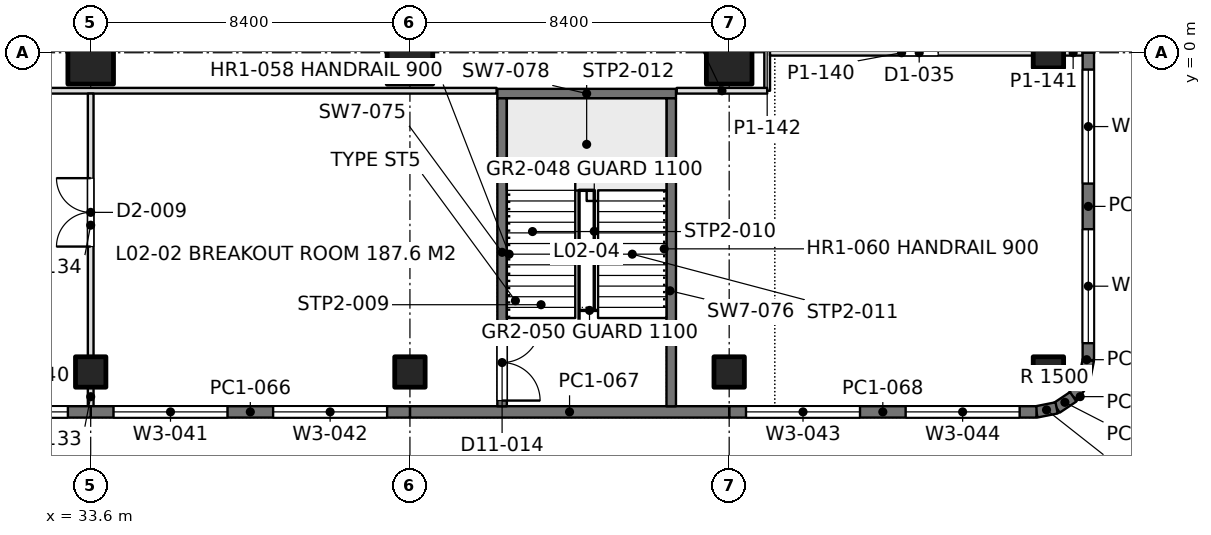
"""IFC4 building model, lengths in metres.
Left out: names, types, materials, properties, quantities, classifications, styles, units other than length and angle.
Written with IfcOpenShell. Run it as: python <this file> out.ifc"""

import sys

from ifc_helpers import new_model, si_unit, direction, frame, frame_2d, origin, origin_2d, place, context, subcontext, project, spatial, rectangle, extrude, element, fill, save


model = new_model("IFC4")
c1 = context("Model", 3, precision=1e-05, world=origin(), true_north=direction((0.0, 1.0)))
c2 = subcontext(c1, "Body", "Model", "MODEL_VIEW")
j1 = project(units=[si_unit("LENGTHUNIT", "METRE"), si_unit("PLANEANGLEUNIT", "RADIAN")], contexts=[c1])
p1 = place(None, origin())
s1 = spatial("IfcSite", under=j1, at=p1, CompositionType="ELEMENT")
p2 = place(p1, origin())
s2 = spatial("IfcBuilding", under=s1, at=p2, CompositionType="ELEMENT")
p3 = place(p2, frame((0.0, 0.0, 9.9)))
s3 = spatial("IfcBuildingStorey", under=s2, at=p3, CompositionType="ELEMENT", Elevation=9.9)
p4 = place(p3, frame((33.6, -8.4, 0.0), z_axis=(0.0, 0.0, 1.0), x_axis=(1.0, 0.0, 0.0)))
e1 = element("IfcColumn", 1, at=p4, inside=s3, PredefinedType="COLUMN", context=c2, shape_type="SweptSolid", body=[
    extrude(rectangle(XDim=0.8, YDim=0.8, at=origin_2d()), origin(), (0.0, 0.0, 1.0), 4.5),
])
p5 = place(p3, frame((33.6, 0.0, 0.0), z_axis=(0.0, 0.0, 1.0), x_axis=(1.0, 0.0, 0.0)))
e2 = element("IfcColumn", 2, at=p5, inside=s3, PredefinedType="COLUMN", context=c2, shape_type="SweptSolid", body=[
    extrude(rectangle(XDim=1.2, YDim=1.65, at=origin_2d()), origin(), (0.0, 0.0, 1.0), 4.5),
])
p6 = place(p3, frame((42.0, -8.4, 0.0), z_axis=(0.0, 0.0, 1.0), x_axis=(1.0, 0.0, 0.0)))
e3 = element("IfcColumn", 3, at=p6, inside=s3, PredefinedType="COLUMN", context=c2, shape_type="SweptSolid", body=[
    extrude(rectangle(XDim=0.8, YDim=0.8, at=origin_2d()), origin(), (0.0, 0.0, 1.0), 4.5),
])
p7 = place(p3, frame((42.0, 0.0, 0.0), z_axis=(0.0, 0.0, 1.0), x_axis=(1.0, 0.0, 0.0)))
e4 = element("IfcColumn", 4, at=p7, inside=s3, PredefinedType="COLUMN", context=c2, shape_type="SweptSolid", body=[
    extrude(rectangle(XDim=1.2, YDim=1.65, at=origin_2d()), origin(), (0.0, 0.0, 1.0), 4.5),
])
p8 = place(p3, frame((50.4, -8.4, 0.0), z_axis=(0.0, 0.0, 1.0), x_axis=(1.0, 0.0, 0.0)))
e5 = element("IfcColumn", 5, at=p8, inside=s3, PredefinedType="COLUMN", context=c2, shape_type="SweptSolid", body=[
    extrude(rectangle(XDim=0.8, YDim=0.8, at=origin_2d()), origin(), (0.0, 0.0, 1.0), 4.5),
])
p9 = place(p3, frame((50.4, 0.0, 0.0), z_axis=(0.0, 0.0, 1.0), x_axis=(1.0, 0.0, 0.0)))
e6 = element("IfcColumn", 6, at=p9, inside=s3, PredefinedType="COLUMN", context=c2, shape_type="SweptSolid", body=[
    extrude(rectangle(XDim=1.2, YDim=1.65, at=origin_2d()), origin(), (0.0, 0.0, 1.0), 4.5),
])
for number, where, z_axis, x_axis in (
    (7, (58.8, -8.4, 0.0), (0.0, 0.0, 1.0), (1.0, 0.0, 0.0)),
    (8, (58.8, 0.0, 0.0), (0.0, 0.0, 1.0), (1.0, 0.0, 0.0)),
):
    element("IfcColumn", number, at=place(p3, frame(where, z_axis=z_axis, x_axis=x_axis)), inside=s3, PredefinedType="COLUMN", context=c2, shape_type="SweptSolid", body=[
        extrude(rectangle(XDim=0.8, YDim=0.8, at=origin_2d()), origin(), (0.0, 0.0, 1.0), 4.5),
    ])
p10 = place(p3, frame((58.485, -9.45, 0.0), z_axis=(0.0, 0.0, 1.0), x_axis=(-1.0, 0.0, 0.0)))
e9 = element("IfcWall", 9, at=p10, inside=s3, PredefinedType="SOLIDWALL", context=c2, shape_type="SweptSolid", body=[
    extrude(rectangle(XDim=8.085, YDim=0.3, at=frame_2d((4.042, 0.0))), origin(), (0.0, 0.0, 1.0), 4.3),
])
p11 = place(p10, frame((0.443, 0.0, 0.9)))
e10 = element("IfcOpeningElement", 10, at=p11, cuts=e9, PredefinedType="OPENING", context=c2, shape_type="SweptSolid", body=[
    extrude(rectangle(XDim=3.0, YDim=2.4, at=frame_2d((1.5, 1.2))), frame((0.0, 0.16, 0.0), z_axis=(0.0, -1.0, 0.0), x_axis=(1.0, 0.0, 0.0)), (0.0, 0.0, 1.0), 0.32),
])
p12 = place(p10, frame((4.643, 0.0, 0.9)))
e11 = element("IfcOpeningElement", 11, at=p12, cuts=e9, PredefinedType="OPENING", context=c2, shape_type="SweptSolid", body=[
    extrude(rectangle(XDim=3.0, YDim=2.4, at=frame_2d((1.5, 1.2))), frame((0.0, 0.16, 0.0), z_axis=(0.0, -1.0, 0.0), x_axis=(1.0, 0.0, 0.0)), (0.0, 0.0, 1.0), 0.32),
])
p13 = place(p3, frame((50.4, -9.45, 0.0), z_axis=(0.0, 0.0, 1.0), x_axis=(-1.0, 0.0, 0.0)))
e12 = element("IfcWall", 12, at=p13, inside=s3, PredefinedType="SOLIDWALL", context=c2, shape_type="SweptSolid", body=[
    extrude(rectangle(XDim=8.4, YDim=0.3, at=frame_2d((4.2, 0.0))), origin(), (0.0, 0.0, 1.0), 4.3),
])
p14 = place(p3, frame((42.0, -9.45, 0.0), z_axis=(0.0, 0.0, 1.0), x_axis=(-1.0, 0.0, 0.0)))
e13 = element("IfcWall", 13, at=p14, inside=s3, PredefinedType="SOLIDWALL", context=c2, shape_type="SweptSolid", body=[
    extrude(rectangle(XDim=8.4, YDim=0.3, at=frame_2d((4.2, 0.0))), origin(), (0.0, 0.0, 1.0), 4.3),
])
p15 = place(p14, frame((0.6, 0.0, 0.9)))
e14 = element("IfcOpeningElement", 14, at=p15, cuts=e13, PredefinedType="OPENING", context=c2, shape_type="SweptSolid", body=[
    extrude(rectangle(XDim=3.0, YDim=2.4, at=frame_2d((1.5, 1.2))), frame((0.0, 0.16, 0.0), z_axis=(0.0, -1.0, 0.0), x_axis=(1.0, 0.0, 0.0)), (0.0, 0.0, 1.0), 0.32),
])
p16 = place(p14, frame((4.8, 0.0, 0.9)))
e15 = element("IfcOpeningElement", 15, at=p16, cuts=e13, PredefinedType="OPENING", context=c2, shape_type="SweptSolid", body=[
    extrude(rectangle(XDim=3.0, YDim=2.4, at=frame_2d((1.5, 1.2))), frame((0.0, 0.16, 0.0), z_axis=(0.0, -1.0, 0.0), x_axis=(1.0, 0.0, 0.0)), (0.0, 0.0, 1.0), 0.32),
])
p17 = place(p3, frame((33.6, -9.45, 0.0), z_axis=(0.0, 0.0, 1.0), x_axis=(-1.0, 0.0, 0.0)))
e16 = element("IfcWall", 16, at=p17, inside=s3, PredefinedType="SOLIDWALL", context=c2, shape_type="SweptSolid", body=[
    extrude(rectangle(XDim=8.4, YDim=0.3, at=frame_2d((4.2, 0.0))), origin(), (0.0, 0.0, 1.0), 4.3),
])
p18 = place(p17, frame((0.6, 0.0, 0.9)))
e17 = element("IfcOpeningElement", 17, at=p18, cuts=e16, PredefinedType="OPENING", context=c2, shape_type="SweptSolid", body=[
    extrude(rectangle(XDim=3.0, YDim=2.4, at=frame_2d((1.5, 1.2))), frame((0.0, 0.16, 0.0), z_axis=(0.0, -1.0, 0.0), x_axis=(1.0, 0.0, 0.0)), (0.0, 0.0, 1.0), 0.32),
])
p19 = place(p17, frame((4.8, 0.0, 0.9)))
e18 = element("IfcOpeningElement", 18, at=p19, cuts=e16, PredefinedType="OPENING", context=c2, shape_type="SweptSolid", body=[
    extrude(rectangle(XDim=3.0, YDim=2.4, at=frame_2d((1.5, 1.2))), frame((0.0, 0.16, 0.0), z_axis=(0.0, -1.0, 0.0), x_axis=(1.0, 0.0, 0.0)), (0.0, 0.0, 1.0), 0.32),
])
p20 = place(p3, frame((59.85, 0.0, 0.0), z_axis=(0.0, 0.0, 1.0), x_axis=(0.0, -1.0, 0.0)))
e19 = element("IfcWall", 19, at=p20, inside=s3, PredefinedType="SOLIDWALL", context=c2, shape_type="SweptSolid", body=[
    extrude(rectangle(XDim=8.085, YDim=0.3, at=frame_2d((4.042, 0.0))), origin(), (0.0, 0.0, 1.0), 4.3),
])
p21 = place(p20, frame((0.443, 0.0, 0.9)))
e20 = element("IfcOpeningElement", 20, at=p21, cuts=e19, PredefinedType="OPENING", context=c2, shape_type="SweptSolid", body=[
    extrude(rectangle(XDim=3.0, YDim=2.4, at=frame_2d((1.5, 1.2))), frame((0.0, 0.16, 0.0), z_axis=(0.0, -1.0, 0.0), x_axis=(1.0, 0.0, 0.0)), (0.0, 0.0, 1.0), 0.32),
])
p22 = place(p20, frame((4.643, 0.0, 0.9)))
e21 = element("IfcOpeningElement", 21, at=p22, cuts=e19, PredefinedType="OPENING", context=c2, shape_type="SweptSolid", body=[
    extrude(rectangle(XDim=3.0, YDim=2.4, at=frame_2d((1.5, 1.2))), frame((0.0, 0.16, 0.0), z_axis=(0.0, -1.0, 0.0), x_axis=(1.0, 0.0, 0.0)), (0.0, 0.0, 1.0), 0.32),
])
p23 = place(p3, frame((59.85, -8.085, 0.0), z_axis=(0.0, 0.0, 1.0), x_axis=(-0.1955082817, -0.980702050465, 0.0)))
e22 = element("IfcWall", 22, at=p23, inside=s3, PredefinedType="SOLIDWALL", context=c2, shape_type="SweptSolid", body=[
    extrude(rectangle(XDim=0.541, YDim=0.3, at=frame_2d((0.271, 0.0))), origin(), (0.0, 0.0, 1.0), 4.3),
])
p24 = place(p3, frame((59.744, -8.615, 0.0), z_axis=(0.0, 0.0, 1.0), x_axis=(-0.555236195849, -0.831692711774, 0.0)))
e23 = element("IfcWall", 23, at=p24, inside=s3, PredefinedType="SOLIDWALL", context=c2, shape_type="SweptSolid", body=[
    extrude(rectangle(XDim=0.525, YDim=0.3, at=frame_2d((0.263, 0.0))), origin(), (0.0, 0.0, 1.0), 4.3),
])
p25 = place(p3, frame((59.453, -9.052, 0.0), z_axis=(0.0, 0.0, 1.0), x_axis=(-0.831621430339, -0.55534295404, 0.0)))
e24 = element("IfcWall", 24, at=p25, inside=s3, PredefinedType="SOLIDWALL", context=c2, shape_type="SweptSolid", body=[
    extrude(rectangle(XDim=0.526, YDim=0.3, at=frame_2d((0.263, 0.0))), origin(), (0.0, 0.0, 1.0), 4.3),
])
p26 = place(p3, frame((59.015, -9.344, 0.0), z_axis=(0.0, 0.0, 1.0), x_axis=(-0.980788534345, -0.195073962632, 0.0)))
e25 = element("IfcWall", 25, at=p26, inside=s3, PredefinedType="SOLIDWALL", context=c2, shape_type="SweptSolid", body=[
    extrude(rectangle(XDim=0.541, YDim=0.3, at=frame_2d((0.271, 0.0))), origin(), (0.0, 0.0, 1.0), 4.3),
])
p27 = place(p3, frame((6.12, -1.0, 0.0), z_axis=(0.0, 0.0, 1.0), x_axis=(1.0, 0.0, 0.0)))
e26 = element("IfcWall", 26, at=p27, inside=s3, PredefinedType="PARTITIONING", context=c2, shape_type="SweptSolid", body=[
    extrude(rectangle(XDim=38.16, YDim=0.15, at=frame_2d((19.08, 0.0))), origin(), (0.0, 0.0, 1.0), 3.65),
])
p28 = place(p27, frame((13.98, 0.0, 0.0)))
e27 = element("IfcOpeningElement", 27, at=p28, cuts=e26, PredefinedType="OPENING", context=c2, shape_type="SweptSolid", body=[
    extrude(rectangle(XDim=1.8, YDim=2.2, at=frame_2d((0.9, 1.1))), frame((0.0, 0.085, 0.0), z_axis=(0.0, -1.0, 0.0), x_axis=(1.0, 0.0, 0.0)), (0.0, 0.0, 1.0), 0.17),
])
p29 = place(p27, frame((22.38, 0.0, 0.0)))
e28 = element("IfcOpeningElement", 28, at=p29, cuts=e26, PredefinedType="OPENING", context=c2, shape_type="SweptSolid", body=[
    extrude(rectangle(XDim=1.8, YDim=2.2, at=frame_2d((0.9, 1.1))), frame((0.0, 0.085, 0.0), z_axis=(0.0, -1.0, 0.0), x_axis=(1.0, 0.0, 0.0)), (0.0, 0.0, 1.0), 0.17),
])
p30 = place(p3, frame((49.02, -1.0, 0.0), z_axis=(0.0, 0.0, 1.0), x_axis=(1.0, 0.0, 0.0)))
e29 = element("IfcWall", 29, at=p30, inside=s3, PredefinedType="PARTITIONING", context=c2, shape_type="SweptSolid", body=[
    extrude(rectangle(XDim=2.38, YDim=0.15, at=frame_2d((1.19, 0.0))), origin(), (0.0, 0.0, 1.0), 3.65),
])
p31 = place(p3, frame((51.474, 0.0, 0.0), z_axis=(0.0, 0.0, 1.0), x_axis=(1.0, 0.0, 0.0)))
e30 = element("IfcWall", 30, at=p31, inside=s3, PredefinedType="PARTITIONING", context=c2, shape_type="SweptSolid", body=[
    extrude(rectangle(XDim=6.927, YDim=0.15, at=frame_2d((3.463, 0.0))), origin(), (0.0, 0.0, 1.0), 3.65),
])
p32 = place(p31, frame((3.426, 0.0, 0.0)))
e31 = element("IfcOpeningElement", 31, at=p32, cuts=e30, PredefinedType="OPENING", context=c2, shape_type="SweptSolid", body=[
    extrude(rectangle(XDim=1.0, YDim=2.2, at=frame_2d((0.5, 1.1))), frame((0.0, 0.085, 0.0), z_axis=(0.0, -1.0, 0.0), x_axis=(1.0, 0.0, 0.0)), (0.0, 0.0, 1.0), 0.17),
])
p33 = place(p3, frame((59.199, 0.0, 0.0), z_axis=(0.0, 0.0, 1.0), x_axis=(1.0, 0.0, 0.0)))
e32 = element("IfcWall", 32, at=p33, inside=s3, PredefinedType="PARTITIONING", context=c2, shape_type="SweptSolid", body=[
    extrude(rectangle(XDim=0.503, YDim=0.15, at=frame_2d((0.251, 0.0))), origin(), (0.0, 0.0, 1.0), 4.3),
])
p34 = place(p3, frame((51.4, -1.0, 0.0), z_axis=(0.0, 0.0, 1.0), x_axis=(0.0, 1.0, 0.0)))
e33 = element("IfcWall", 33, at=p34, inside=s3, PredefinedType="PARTITIONING", context=c2, shape_type="SweptSolid", body=[
    extrude(rectangle(XDim=2.38, YDim=0.15, at=frame_2d((1.19, 0.0))), origin(), (0.0, 0.0, 1.0), 3.65),
])
p35 = place(p3, frame((33.6, -9.3, 0.0), z_axis=(0.0, 0.0, 1.0), x_axis=(0.0, 1.0, 0.0)))
e34 = element("IfcWall", 34, at=p35, inside=s3, PredefinedType="PARTITIONING", context=c2, shape_type="SweptSolid", body=[
    extrude(rectangle(XDim=0.501, YDim=0.15, at=frame_2d((0.25, 0.0))), origin(), (0.0, 0.0, 1.0), 4.3),
])
p36 = place(p3, frame((33.6, -8.001, 0.0), z_axis=(0.0, 0.0, 1.0), x_axis=(0.0, 1.0, 0.0)))
e35 = element("IfcWall", 35, at=p36, inside=s3, PredefinedType="PARTITIONING", context=c2, shape_type="SweptSolid", body=[
    extrude(rectangle(XDim=6.927, YDim=0.15, at=frame_2d((3.463, 0.0))), origin(), (0.0, 0.0, 1.0), 3.65),
])
p37 = place(p36, frame((2.901, 0.0, 0.0)))
e36 = element("IfcOpeningElement", 36, at=p37, cuts=e35, PredefinedType="OPENING", context=c2, shape_type="SweptSolid", body=[
    extrude(rectangle(XDim=1.8, YDim=2.2, at=frame_2d((0.9, 1.1))), frame((0.0, 0.085, 0.0), z_axis=(0.0, -1.0, 0.0), x_axis=(1.0, 0.0, 0.0)), (0.0, 0.0, 1.0), 0.17),
])
p38 = place(p3, frame((44.425, -9.302, 0.0), z_axis=(0.0, 0.0, 1.0), x_axis=(0.0, 1.0, 0.0)))
e37 = element("IfcWall", 37, at=p38, inside=s3, PredefinedType="SOLIDWALL", context=c2, shape_type="SweptSolid", body=[
    extrude(rectangle(XDim=8.102, YDim=0.25, at=frame_2d((4.051, 0.0))), origin(), (0.0, 0.0, 1.0), 4.5),
])
p39 = place(p38, frame((0.15, 0.0, 0.0)))
e38 = element("IfcOpeningElement", 38, at=p39, cuts=e37, PredefinedType="OPENING", context=c2, shape_type="SweptSolid", body=[
    extrude(rectangle(XDim=2.0, YDim=2.2, at=frame_2d((1.0, 1.1))), frame((0.0, 0.135, 0.0), z_axis=(0.0, -1.0, 0.0), x_axis=(1.0, 0.0, 0.0)), (0.0, 0.0, 1.0), 0.27),
])
p40 = place(p3, frame((48.875, -9.302, 0.0), z_axis=(0.0, 0.0, 1.0), x_axis=(0.0, 1.0, 0.0)))
e39 = element("IfcWall", 39, at=p40, inside=s3, PredefinedType="SOLIDWALL", context=c2, shape_type="SweptSolid", body=[
    extrude(rectangle(XDim=8.102, YDim=0.25, at=frame_2d((4.051, 0.0))), origin(), (0.0, 0.0, 1.0), 4.5),
])
p41 = place(p3, frame((44.3, -1.075, 0.0), z_axis=(0.0, 0.0, 1.0), x_axis=(1.0, 0.0, 0.0)))
e40 = element("IfcWall", 40, at=p41, inside=s3, PredefinedType="SOLIDWALL", context=c2, shape_type="SweptSolid", body=[
    extrude(rectangle(XDim=4.7, YDim=0.25, at=frame_2d((2.35, 0.0))), origin(), (0.0, 0.0, 1.0), 4.5),
])
p42 = place(p11, origin())
e41 = element("IfcWindow", 41, at=p42, inside=s3, PartitioningType="SINGLE_PANEL", PredefinedType="WINDOW", context=c2, shape_type="SweptSolid", body=[
    extrude(rectangle(XDim=3.0, YDim=2.4, at=frame_2d((1.5, 1.2))), frame((0.0, 0.03, 0.0), z_axis=(0.0, -1.0, 0.0), x_axis=(1.0, 0.0, 0.0)), (0.0, 0.0, 1.0), 0.06),
])
fill(e10, e41)
p43 = place(p12, origin())
e42 = element("IfcWindow", 42, at=p43, inside=s3, PartitioningType="SINGLE_PANEL", PredefinedType="WINDOW", context=c2, shape_type="SweptSolid", body=[
    extrude(rectangle(XDim=3.0, YDim=2.4, at=frame_2d((1.5, 1.2))), frame((0.0, 0.03, 0.0), z_axis=(0.0, -1.0, 0.0), x_axis=(1.0, 0.0, 0.0)), (0.0, 0.0, 1.0), 0.06),
])
fill(e11, e42)
p44 = place(p15, origin())
e43 = element("IfcWindow", 43, at=p44, inside=s3, PartitioningType="SINGLE_PANEL", PredefinedType="WINDOW", context=c2, shape_type="SweptSolid", body=[
    extrude(rectangle(XDim=3.0, YDim=2.4, at=frame_2d((1.5, 1.2))), frame((0.0, 0.03, 0.0), z_axis=(0.0, -1.0, 0.0), x_axis=(1.0, 0.0, 0.0)), (0.0, 0.0, 1.0), 0.06),
])
fill(e14, e43)
p45 = place(p16, origin())
e44 = element("IfcWindow", 44, at=p45, inside=s3, PartitioningType="SINGLE_PANEL", PredefinedType="WINDOW", context=c2, shape_type="SweptSolid", body=[
    extrude(rectangle(XDim=3.0, YDim=2.4, at=frame_2d((1.5, 1.2))), frame((0.0, 0.03, 0.0), z_axis=(0.0, -1.0, 0.0), x_axis=(1.0, 0.0, 0.0)), (0.0, 0.0, 1.0), 0.06),
])
fill(e15, e44)
p46 = place(p18, origin())
e45 = element("IfcWindow", 45, at=p46, inside=s3, PartitioningType="SINGLE_PANEL", PredefinedType="WINDOW", context=c2, shape_type="SweptSolid", body=[
    extrude(rectangle(XDim=3.0, YDim=2.4, at=frame_2d((1.5, 1.2))), frame((0.0, 0.03, 0.0), z_axis=(0.0, -1.0, 0.0), x_axis=(1.0, 0.0, 0.0)), (0.0, 0.0, 1.0), 0.06),
])
fill(e17, e45)
p47 = place(p21, origin())
e46 = element("IfcWindow", 46, at=p47, inside=s3, PartitioningType="SINGLE_PANEL", PredefinedType="WINDOW", context=c2, shape_type="SweptSolid", body=[
    extrude(rectangle(XDim=3.0, YDim=2.4, at=frame_2d((1.5, 1.2))), frame((0.0, 0.03, 0.0), z_axis=(0.0, -1.0, 0.0), x_axis=(1.0, 0.0, 0.0)), (0.0, 0.0, 1.0), 0.06),
])
fill(e20, e46)
p48 = place(p22, origin())
e47 = element("IfcWindow", 47, at=p48, inside=s3, PartitioningType="SINGLE_PANEL", PredefinedType="WINDOW", context=c2, shape_type="SweptSolid", body=[
    extrude(rectangle(XDim=3.0, YDim=2.4, at=frame_2d((1.5, 1.2))), frame((0.0, 0.03, 0.0), z_axis=(0.0, -1.0, 0.0), x_axis=(1.0, 0.0, 0.0)), (0.0, 0.0, 1.0), 0.06),
])
fill(e21, e47)
p49 = place(p32, origin())
e48 = element("IfcDoor", 48, at=p49, inside=s3, OperationType="SINGLE_SWING_LEFT", PredefinedType="DOOR", context=c2, shape_type="SweptSolid", body=[
    extrude(rectangle(XDim=1.0, YDim=2.2, at=frame_2d((0.5, 1.1))), frame((0.0, 0.025, 0.0), z_axis=(0.0, -1.0, 0.0), x_axis=(1.0, 0.0, 0.0)), (0.0, 0.0, 1.0), 0.05),
])
fill(e31, e48)
p50 = place(p37, origin())
e49 = element("IfcDoor", 49, at=p50, inside=s3, OperationType="DOUBLE_DOOR_SINGLE_SWING", PredefinedType="DOOR", context=c2, shape_type="SweptSolid", body=[
    extrude(rectangle(XDim=1.8, YDim=2.2, at=frame_2d((0.9, 1.1))), frame((0.0, 0.025, 0.0), z_axis=(0.0, -1.0, 0.0), x_axis=(1.0, 0.0, 0.0)), (0.0, 0.0, 1.0), 0.05),
])
fill(e36, e49)
p51 = place(p39, frame((2.0, 0.0, 0.0), z_axis=(0.0, 0.0, 1.0), x_axis=(-1.0, 0.0, 0.0)))
e50 = element("IfcDoor", 50, at=p51, inside=s3, OperationType="DOUBLE_DOOR_SINGLE_SWING", PredefinedType="DOOR", context=c2, shape_type="SweptSolid", body=[
    extrude(rectangle(XDim=2.0, YDim=2.2, at=frame_2d((1.0, 1.1))), frame((0.0, 0.025, 0.0), z_axis=(0.0, -1.0, 0.0), x_axis=(1.0, 0.0, 0.0)), (0.0, 0.0, 1.0), 0.05),
])
fill(e38, e50)
save(model, sys.argv[1])
